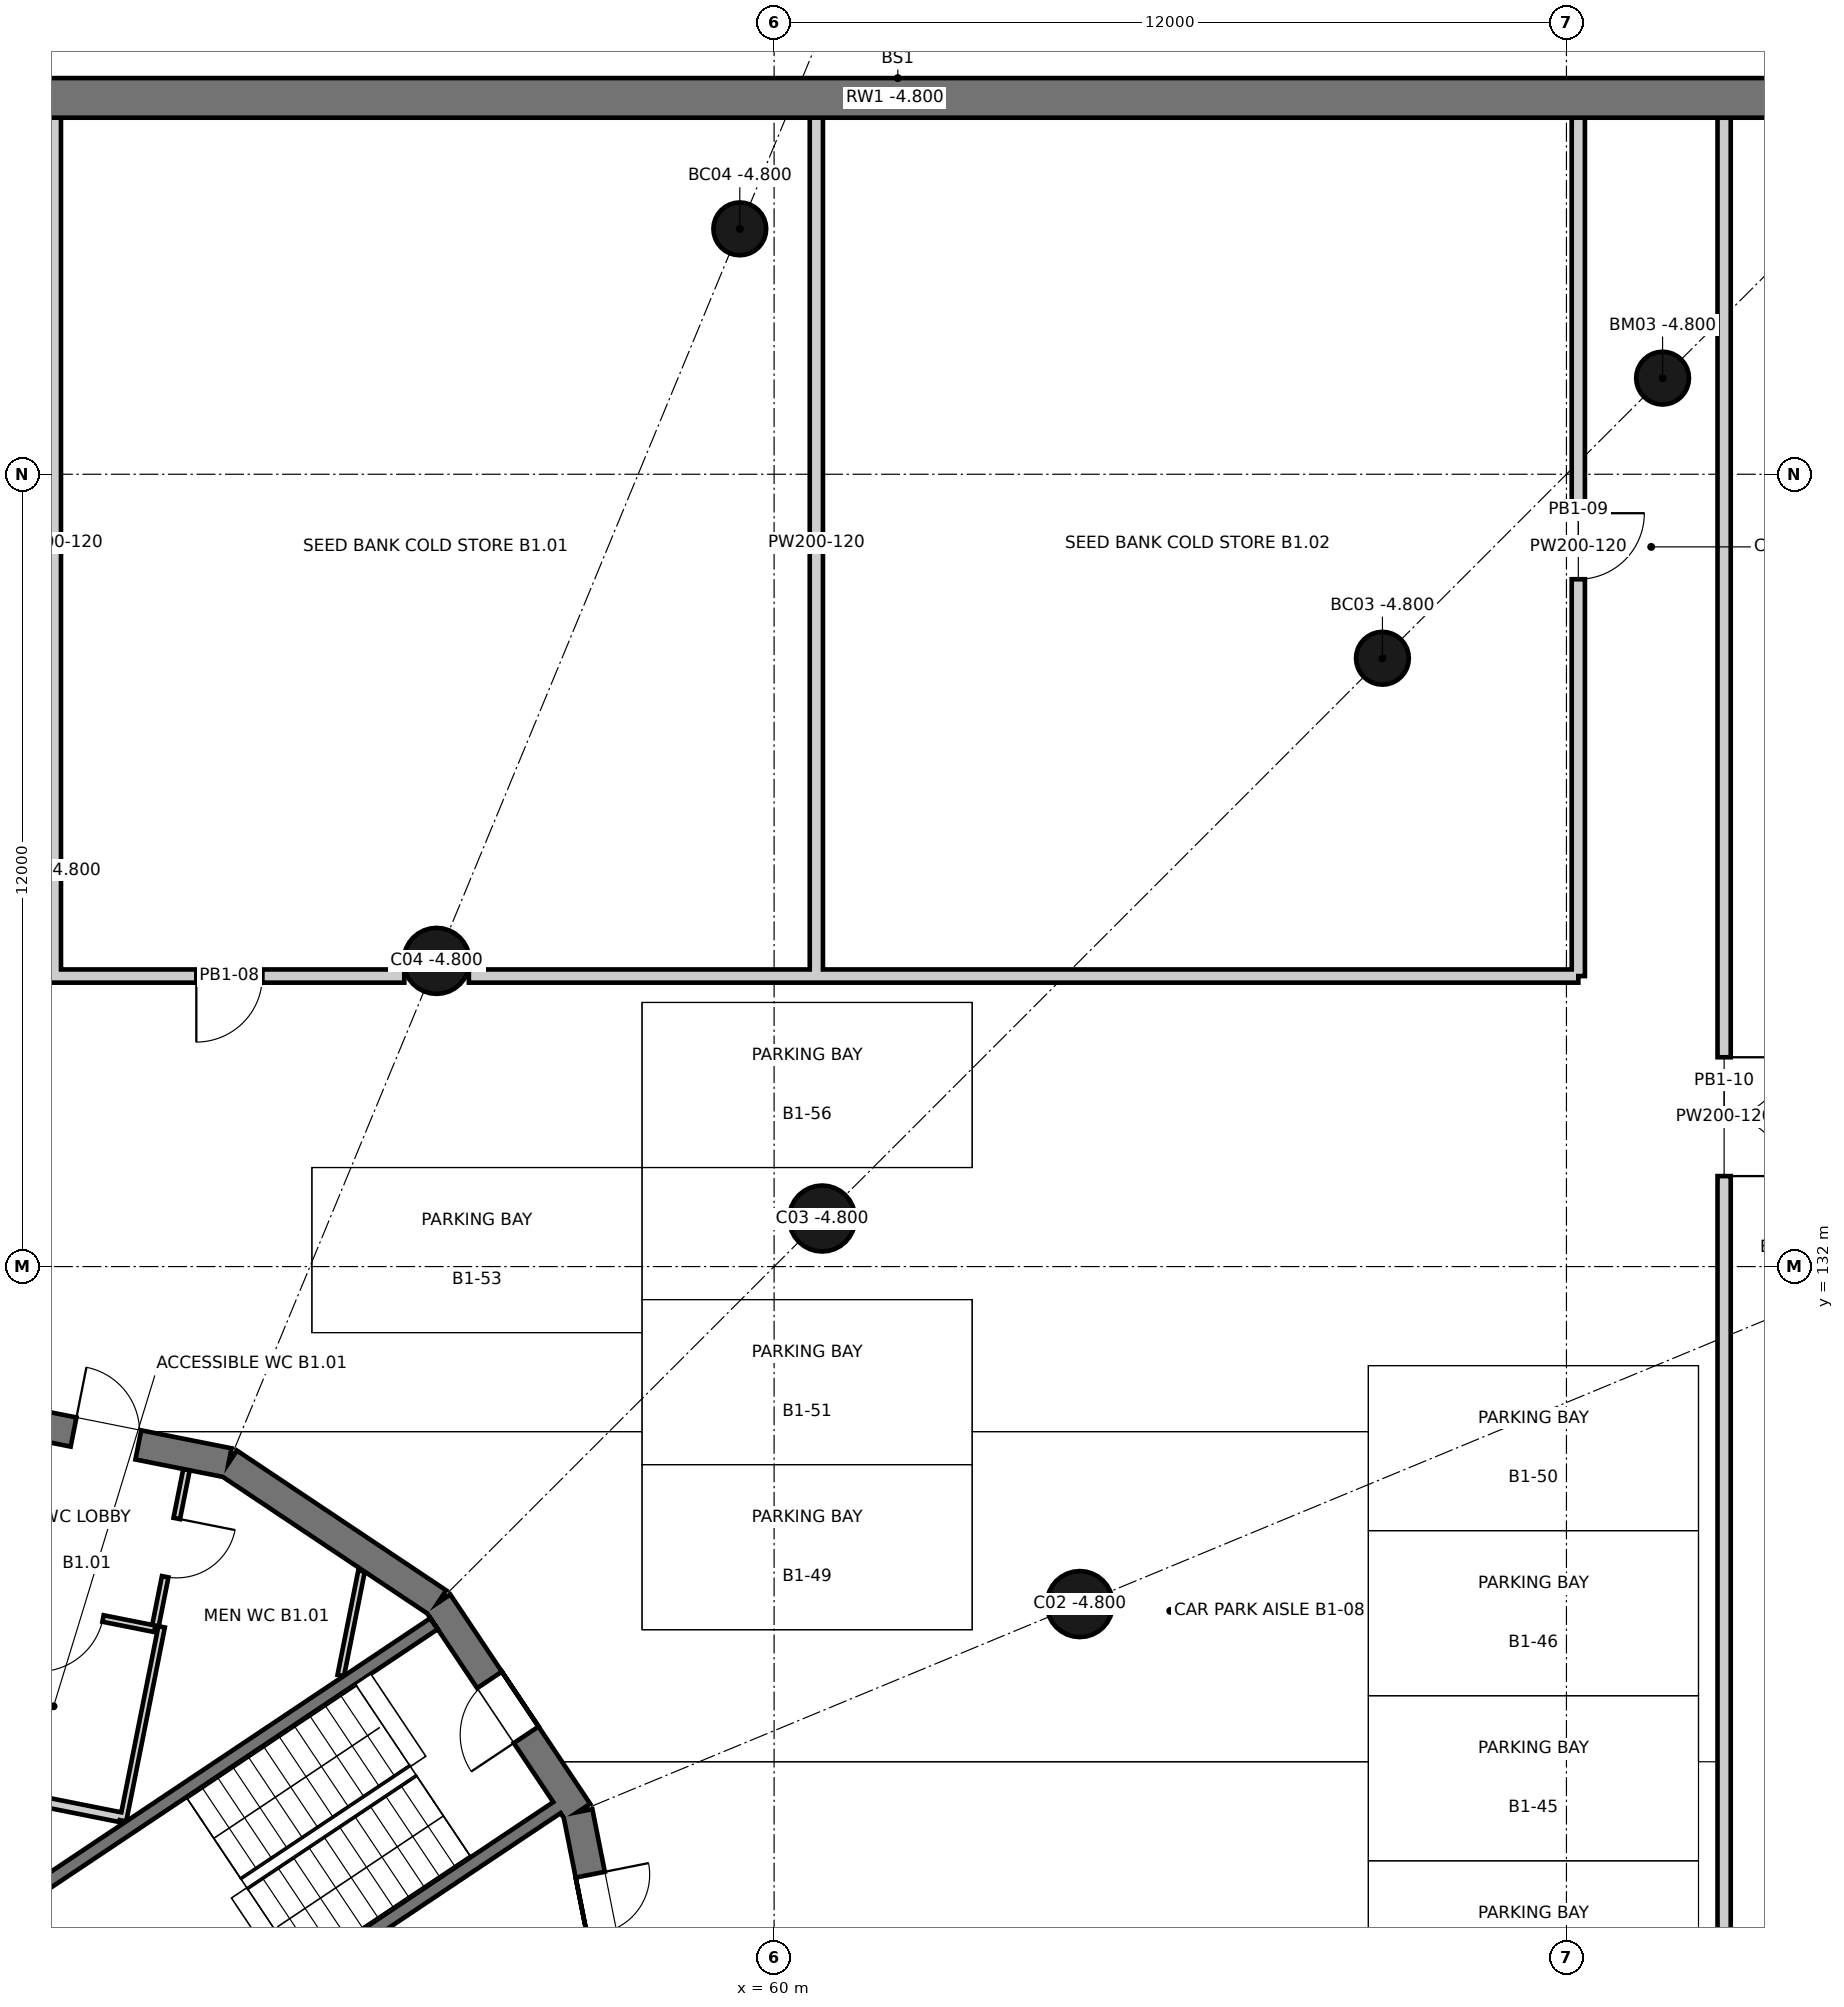
"""IFC4 building model, lengths in metres.
Left out: names, types, materials, properties, quantities, classifications, styles, units other than length and angle.
Written with IfcOpenShell. Run it as: python <this file> out.ifc"""

import sys

from ifc_helpers import new_model, si_unit, direction, frame, frame_2d, origin, origin_2d, place, context, subcontext, project, spatial, polyline, rectangle, circle, outline, extrude, element, fill, save


model = new_model("IFC4")
c1 = context("Model", 3, precision=1e-05, world=origin(), true_north=direction((0.0, 1.0)))
c2 = subcontext(c1, "Body", "Model", "MODEL_VIEW")
j1 = project(units=[si_unit("LENGTHUNIT", "METRE"), si_unit("PLANEANGLEUNIT", "RADIAN")], contexts=[c1])
p1 = place(None, origin())
s1 = spatial("IfcSite", under=j1, at=p1, CompositionType="ELEMENT")
p2 = place(p1, origin())
s2 = spatial("IfcBuilding", under=s1, at=p2, CompositionType="ELEMENT")
p3 = place(p2, frame((0.0, 0.0, -4.2)))
s3 = spatial("IfcBuildingStorey", under=s2, at=p3, CompositionType="ELEMENT", Elevation=-4.2)
p4 = place(p3, frame((57.771, 120.0, -0.6), z_axis=(0.0, 0.0, 1.0), x_axis=(-0.195069197673, 0.98078948206, 0.0)))
e1 = element("IfcWall", 1, at=p4, inside=s3, PredefinedType="SHEAR", context=c2, shape_type="SweptSolid", body=[
    extrude(outline(polyline([(-0.045, -0.225), (3.857, -0.225), (3.768, 0.225), (0.045, 0.225), (-0.045, -0.225)])), origin(), (0.0, 0.0, 1.0), 4.8),
])
p5 = place(p4, frame((1.945, 0.0, 0.6)))
e2 = element("IfcOpeningElement", 2, at=p5, cuts=e1, PredefinedType="OPENING", context=c2, shape_type="SweptSolid", body=[
    extrude(rectangle(XDim=0.9, YDim=2.1, at=frame_2d((0.45, 1.05))), frame((0.0, 0.235, 0.0), z_axis=(0.0, -1.0, 0.0), x_axis=(1.0, 0.0, 0.0)), (0.0, 0.0, 1.0), 0.47),
])
p6 = place(p3, frame((57.027, 123.739, -0.6), z_axis=(0.0, 0.0, 1.0), x_axis=(-0.555542277102, 0.83148829117, 0.0)))
e3 = element("IfcWall", 3, at=p6, inside=s3, PredefinedType="SHEAR", context=c2, shape_type="SweptSolid", body=[
    extrude(outline(polyline([(-0.045, -0.225), (3.857, -0.225), (3.768, 0.225), (0.045, 0.225), (-0.045, -0.225)])), origin(), (0.0, 0.0, 1.0), 4.8),
])
p7 = place(p6, frame((1.406, 0.0, 0.6)))
e4 = element("IfcOpeningElement", 4, at=p7, cuts=e3, PredefinedType="OPENING", context=c2, shape_type="SweptSolid", body=[
    extrude(rectangle(XDim=1.0, YDim=2.1, at=frame_2d((0.5, 1.05))), frame((0.0, 0.235, 0.0), z_axis=(0.0, -1.0, 0.0), x_axis=(1.0, 0.0, 0.0)), (0.0, 0.0, 1.0), 0.47),
])
p8 = place(p3, frame((54.909, 126.909, -0.6), z_axis=(0.0, 0.0, 1.0), x_axis=(-0.83148829117, 0.555542277102, 0.0)))
e5 = element("IfcWall", 5, at=p8, inside=s3, PredefinedType="SHEAR", context=c2, shape_type="SweptSolid", body=[
    extrude(outline(polyline([(-0.045, -0.225), (3.857, -0.225), (3.768, 0.225), (0.045, 0.225), (-0.045, -0.225)])), origin(), (0.0, 0.0, 1.0), 4.8),
])
p9 = place(p3, frame((51.739, 129.027, -0.6), z_axis=(0.0, 0.0, 1.0), x_axis=(-0.98078948206, 0.195069197673, 0.0)))
e6 = element("IfcWall", 6, at=p9, inside=s3, PredefinedType="SHEAR", context=c2, shape_type="SweptSolid", body=[
    extrude(outline(polyline([(-0.045, -0.225), (3.857, -0.225), (3.768, 0.225), (0.045, 0.225), (-0.045, -0.225)])), origin(), (0.0, 0.0, 1.0), 4.8),
])
p10 = place(p9, frame((1.395, 0.0, 0.6)))
e7 = element("IfcOpeningElement", 7, at=p10, cuts=e6, PredefinedType="OPENING", context=c2, shape_type="SweptSolid", body=[
    extrude(rectangle(XDim=1.0, YDim=2.1, at=frame_2d((0.5, 1.05))), frame((0.0, 0.235, 0.0), z_axis=(0.0, -1.0, 0.0), x_axis=(1.0, 0.0, 0.0)), (0.0, 0.0, 1.0), 0.47),
])
p11 = place(p3, frame((48.365, 122.258, -0.6), z_axis=(0.0, 0.0, 1.0), x_axis=(0.831476803301, 0.555559470779, 0.0)))
e8 = element("IfcWall", 8, at=p11, inside=s3, PredefinedType="SHEAR", context=c2, shape_type="SweptSolid", body=[
    extrude(rectangle(XDim=7.8, YDim=0.2, at=frame_2d((3.9, 0.0))), origin(), (0.0, 0.0, 1.0), 4.8),
])
p12 = place(p3, frame((50.226, 119.473, -0.6), z_axis=(0.0, 0.0, 1.0), x_axis=(0.831486463828, 0.555545012102, 0.0)))
e9 = element("IfcWall", 9, at=p12, inside=s3, PredefinedType="SHEAR", context=c2, shape_type="SweptSolid", body=[
    extrude(rectangle(XDim=7.8, YDim=0.2, at=frame_2d((3.9, 0.0))), origin(), (0.0, 0.0, 1.0), 4.8),
])
p13 = place(p3, frame((50.253, 119.612, -0.6), z_axis=(0.0, 0.0, 1.0), x_axis=(-0.55555842186, 0.831477504146, 0.0)))
e10 = element("IfcWall", 10, at=p13, inside=s3, PredefinedType="SHEAR", context=c2, shape_type="SweptSolid", body=[
    extrude(rectangle(XDim=3.15, YDim=0.2, at=frame_2d((1.575, 0.0))), origin(), (0.0, 0.0, 1.0), 4.8),
])
for number, where, z_axis, x_axis in (
    (11, (64.63, 126.888, -0.6), (0.0, 0.0, 1.0), (1.0, 0.0, 0.0)),
    (12, (60.728, 132.728, -0.6), (0.0, 0.0, 1.0), (1.0, 0.0, 0.0)),
    (13, (54.888, 136.63, -0.6), (0.0, 0.0, 1.0), (1.0, 0.0, 0.0)),
):
    element("IfcColumn", number, at=place(p3, frame(where, z_axis=z_axis, x_axis=x_axis)), inside=s3, PredefinedType="COLUMN", context=c2, shape_type="SweptSolid", body=[
        extrude(circle(Radius=0.5, at=origin_2d()), origin(), (0.0, 0.0, 1.0), 4.8),
    ])
for number, where, z_axis, x_axis in (
    (14, (69.213, 141.213, -0.6), (0.0, 0.0, 1.0), (1.0, 0.0, 0.0)),
    (15, (59.48, 147.716, -0.6), (0.0, 0.0, 1.0), (1.0, 0.0, 0.0)),
    (16, (73.456, 145.456, -0.6), (0.0, 0.0, 1.0), (1.0, 0.0, 0.0)),
):
    element("IfcColumn", number, at=place(p3, frame(where, z_axis=z_axis, x_axis=x_axis)), inside=s3, PredefinedType="COLUMN", context=c2, shape_type="SweptSolid", body=[
        extrude(circle(Radius=0.4, at=origin_2d()), origin(), (0.0, 0.0, 1.0), 4.35),
    ])
p14 = place(p3, frame((77.156, 149.7, -0.6), z_axis=(0.0, 0.0, 1.0), x_axis=(-1.0, 0.0, 0.0)))
e17 = element("IfcWall", 17, at=p14, inside=s3, PredefinedType="SOLIDWALL", context=c2, shape_type="SweptSolid", body=[
    extrude(outline(polyline([(-0.091, -0.3), (58.404, -0.3), (58.221, 0.3), (0.091, 0.3), (-0.091, -0.3)])), origin(), (0.0, 0.0, 1.0), 4.8),
])
p15 = place(p3, frame((50.621, 126.514, 0.0), z_axis=(0.0, 0.0, 1.0), x_axis=(-0.980796771907, 0.195032541431, 0.0)))
e18 = element("IfcWall", 18, at=p15, inside=s3, PredefinedType="PARTITIONING", context=c2, shape_type="SweptSolid", body=[
    extrude(rectangle(XDim=2.6, YDim=0.1, at=frame_2d((1.3, 0.0))), origin(), (0.0, 0.0, 1.0), 3.85),
])
p16 = place(p15, frame((0.8, 0.0, 0.0)))
e19 = element("IfcOpeningElement", 19, at=p16, cuts=e18, PredefinedType="OPENING", context=c2, shape_type="SweptSolid", body=[
    extrude(rectangle(XDim=1.0, YDim=2.1, at=frame_2d((0.5, 1.05))), frame((0.0, 0.06, 0.0), z_axis=(0.0, -1.0, 0.0), x_axis=(1.0, 0.0, 0.0)), (0.0, 0.0, 1.0), 0.12),
])
p17 = place(p3, frame((51.101, 128.924, 0.0), z_axis=(0.0, 0.0, 1.0), x_axis=(-0.195082584577, -0.980786819444, 0.0)))
e20 = element("IfcWall", 20, at=p17, inside=s3, PredefinedType="PARTITIONING", context=c2, shape_type="SweptSolid", body=[
    extrude(rectangle(XDim=2.408, YDim=0.1, at=frame_2d((1.204, 0.0))), origin(), (0.0, 0.0, 1.0), 3.85),
])
p18 = place(p17, frame((0.754, 0.0, 0.0)))
e21 = element("IfcOpeningElement", 21, at=p18, cuts=e20, PredefinedType="OPENING", context=c2, shape_type="SweptSolid", body=[
    extrude(rectangle(XDim=0.9, YDim=2.1, at=frame_2d((0.45, 1.05))), frame((0.0, 0.06, 0.0), z_axis=(0.0, -1.0, 0.0), x_axis=(1.0, 0.0, 0.0)), (0.0, 0.0, 1.0), 0.12),
])
p19 = place(p3, frame((50.099, 123.661, 0.0), z_axis=(0.0, 0.0, 1.0), x_axis=(-0.980775457146, 0.195139700368, 0.0)))
e22 = element("IfcWall", 22, at=p19, inside=s3, PredefinedType="PARTITIONING", context=c2, shape_type="SweptSolid", body=[
    extrude(rectangle(XDim=2.645, YDim=0.15, at=frame_2d((1.322, 0.0))), origin(), (0.0, 0.0, 1.0), 3.85),
])
p20 = place(p3, frame((50.724, 126.544, 0.0), z_axis=(0.0, 0.0, 1.0), x_axis=(-0.195081327989, -0.980787069384, 0.0)))
e23 = element("IfcWall", 23, at=p20, inside=s3, PredefinedType="PARTITIONING", context=c2, shape_type="SweptSolid", body=[
    extrude(rectangle(XDim=2.995, YDim=0.1, at=frame_2d((1.498, 0.0))), origin(), (0.0, 0.0, 1.0), 3.85),
])
p21 = place(p3, frame((53.752, 127.389, 0.0), z_axis=(0.0, 0.0, 1.0), x_axis=(-0.195010443139, -0.980801165918, 0.0)))
e24 = element("IfcWall", 24, at=p21, inside=s3, PredefinedType="PARTITIONING", context=c2, shape_type="SweptSolid", body=[
    extrude(rectangle(XDim=1.614, YDim=0.1, at=frame_2d((0.807, 0.0))), origin(), (0.0, 0.0, 1.0), 3.85),
])
p22 = place(p3, frame((49.1, 149.42, 0.0), z_axis=(0.0, 0.0, 1.0), x_axis=(0.0, -1.0, 0.0)))
e25 = element("IfcWall", 25, at=p22, inside=s3, PredefinedType="SOLIDWALL", context=c2, shape_type="SweptSolid", body=[
    extrude(rectangle(XDim=12.925, YDim=0.2, at=frame_2d((6.462, 0.0))), origin(), (0.0, 0.0, 1.0), 3.75),
])
p23 = place(p3, frame((49.1, 136.4, 0.0), z_axis=(0.0, 0.0, 1.0), x_axis=(-1.0, 0.0, 0.0)))
e26 = element("IfcWall", 26, at=p23, inside=s3, PredefinedType="SOLIDWALL", context=c2, shape_type="SweptSolid", body=[
    extrude(rectangle(XDim=7.5, YDim=0.2, at=frame_2d((3.75, 0.0))), origin(), (0.0, 0.0, 1.0), 3.85),
])
p24 = place(p3, frame((60.64, 149.42, 0.0), z_axis=(0.0, 0.0, 1.0), x_axis=(0.0, -1.0, 0.0)))
e27 = element("IfcWall", 27, at=p24, inside=s3, PredefinedType="SOLIDWALL", context=c2, shape_type="SweptSolid", body=[
    extrude(rectangle(XDim=12.925, YDim=0.2, at=frame_2d((6.462, 0.0))), origin(), (0.0, 0.0, 1.0), 3.75),
])
p25 = place(p3, frame((54.399, 136.4, 0.0), z_axis=(0.0, 0.0, 1.0), x_axis=(-1.0, 0.0, 0.0)))
e28 = element("IfcWall", 28, at=p25, inside=s3, PredefinedType="SOLIDWALL", context=c2, shape_type="SweptSolid", body=[
    extrude(rectangle(XDim=5.299, YDim=0.2, at=frame_2d((2.65, 0.0))), origin(), (0.0, 0.0, 1.0), 3.85),
])
p26 = place(p25, frame((2.15, 0.0, 0.0)))
e29 = element("IfcOpeningElement", 29, at=p26, cuts=e28, PredefinedType="OPENING", context=c2, shape_type="SweptSolid", body=[
    extrude(rectangle(XDim=1.0, YDim=2.1, at=frame_2d((0.5, 1.05))), frame((0.0, 0.11, 0.0), z_axis=(0.0, -1.0, 0.0), x_axis=(1.0, 0.0, 0.0)), (0.0, 0.0, 1.0), 0.22),
])
p27 = place(p3, frame((60.64, 136.4, 0.0), z_axis=(0.0, 0.0, 1.0), x_axis=(-1.0, 0.0, 0.0)))
e30 = element("IfcWall", 30, at=p27, inside=s3, PredefinedType="SOLIDWALL", context=c2, shape_type="SweptSolid", body=[
    extrude(rectangle(XDim=5.263, YDim=0.2, at=frame_2d((2.631, 0.0))), origin(), (0.0, 0.0, 1.0), 3.85),
])
p28 = place(p3, frame((72.18, 149.42, 0.0), z_axis=(0.0, 0.0, 1.0), x_axis=(0.0, -1.0, 0.0)))
e31 = element("IfcWall", 31, at=p28, inside=s3, PredefinedType="SOLIDWALL", context=c2, shape_type="SweptSolid", body=[
    extrude(rectangle(XDim=13.02, YDim=0.2, at=frame_2d((6.51, 0.0))), origin(), (0.0, 0.0, 1.0), 3.75),
])
p29 = place(p28, frame((6.01, 0.0, 0.0)))
e32 = element("IfcOpeningElement", 32, at=p29, cuts=e31, PredefinedType="OPENING", context=c2, shape_type="SweptSolid", body=[
    extrude(rectangle(XDim=1.0, YDim=2.1, at=frame_2d((0.5, 1.05))), frame((0.0, 0.11, 0.0), z_axis=(0.0, -1.0, 0.0), x_axis=(1.0, 0.0, 0.0)), (0.0, 0.0, 1.0), 0.22),
])
p30 = place(p3, frame((72.18, 136.4, 0.0), z_axis=(0.0, 0.0, 1.0), x_axis=(-1.0, 0.0, 0.0)))
e33 = element("IfcWall", 33, at=p30, inside=s3, PredefinedType="SOLIDWALL", context=c2, shape_type="SweptSolid", body=[
    extrude(rectangle(XDim=11.54, YDim=0.2, at=frame_2d((5.77, 0.0))), origin(), (0.0, 0.0, 1.0), 3.75),
])
p31 = place(p3, frame((74.388, 119.12, 0.0), z_axis=(0.0, 0.0, 1.0), x_axis=(0.0, 1.0, 0.0)))
e34 = element("IfcWall", 34, at=p31, inside=s3, PredefinedType="SOLIDWALL", context=c2, shape_type="SweptSolid", body=[
    extrude(rectangle(XDim=30.3, YDim=0.2, at=frame_2d((15.15, 0.0))), origin(), (0.0, 0.0, 1.0), 3.75),
])
p32 = place(p31, frame((14.25, 0.0, 0.0)))
e35 = element("IfcOpeningElement", 35, at=p32, cuts=e34, PredefinedType="OPENING", context=c2, shape_type="SweptSolid", body=[
    extrude(rectangle(XDim=1.8, YDim=2.1, at=frame_2d((0.9, 1.05))), frame((0.0, 0.11, 0.0), z_axis=(0.0, -1.0, 0.0), x_axis=(1.0, 0.0, 0.0)), (0.0, 0.0, 1.0), 0.22),
])
p33 = place(p7, origin())
e36 = element("IfcDoor", 36, at=p33, inside=s3, OperationType="SINGLE_SWING_LEFT", PredefinedType="DOOR", context=c2, shape_type="SweptSolid", body=[
    extrude(rectangle(XDim=1.0, YDim=2.1, at=frame_2d((0.5, 1.05))), frame((0.0, 0.025, 0.0), z_axis=(0.0, -1.0, 0.0), x_axis=(1.0, 0.0, 0.0)), (0.0, 0.0, 1.0), 0.05),
])
fill(e4, e36)
p34 = place(p5, frame((0.9, 0.0, 0.0), z_axis=(0.0, 0.0, 1.0), x_axis=(-1.0, 0.0, 0.0)))
e37 = element("IfcDoor", 37, at=p34, inside=s3, OperationType="SINGLE_SWING_LEFT", PredefinedType="DOOR", context=c2, shape_type="SweptSolid", body=[
    extrude(rectangle(XDim=0.9, YDim=2.1, at=frame_2d((0.45, 1.05))), frame((0.0, 0.025, 0.0), z_axis=(0.0, -1.0, 0.0), x_axis=(1.0, 0.0, 0.0)), (0.0, 0.0, 1.0), 0.05),
])
fill(e2, e37)
p35 = place(p10, frame((1.0, 0.0, 0.0), z_axis=(0.0, 0.0, 1.0), x_axis=(-1.0, 0.0, 0.0)))
e38 = element("IfcDoor", 38, at=p35, inside=s3, OperationType="SINGLE_SWING_LEFT", PredefinedType="DOOR", context=c2, shape_type="SweptSolid", body=[
    extrude(rectangle(XDim=1.0, YDim=2.1, at=frame_2d((0.5, 1.05))), frame((0.0, 0.025, 0.0), z_axis=(0.0, -1.0, 0.0), x_axis=(1.0, 0.0, 0.0)), (0.0, 0.0, 1.0), 0.05),
])
fill(e7, e38)
p36 = place(p16, origin())
e39 = element("IfcDoor", 39, at=p36, inside=s3, OperationType="SINGLE_SWING_RIGHT", PredefinedType="DOOR", context=c2, shape_type="SweptSolid", body=[
    extrude(rectangle(XDim=1.0, YDim=2.1, at=frame_2d((0.5, 1.05))), frame((0.0, 0.025, 0.0), z_axis=(0.0, -1.0, 0.0), x_axis=(1.0, 0.0, 0.0)), (0.0, 0.0, 1.0), 0.05),
])
fill(e19, e39)
p37 = place(p18, origin())
e40 = element("IfcDoor", 40, at=p37, inside=s3, OperationType="SINGLE_SWING_LEFT", PredefinedType="DOOR", context=c2, shape_type="SweptSolid", body=[
    extrude(rectangle(XDim=0.9, YDim=2.1, at=frame_2d((0.45, 1.05))), frame((0.0, 0.025, 0.0), z_axis=(0.0, -1.0, 0.0), x_axis=(1.0, 0.0, 0.0)), (0.0, 0.0, 1.0), 0.05),
])
fill(e21, e40)
p38 = place(p26, origin())
e41 = element("IfcDoor", 41, at=p38, inside=s3, OperationType="SINGLE_SWING_RIGHT", PredefinedType="DOOR", context=c2, shape_type="SweptSolid", body=[
    extrude(rectangle(XDim=1.0, YDim=2.1, at=frame_2d((0.5, 1.05))), frame((0.0, 0.025, 0.0), z_axis=(0.0, -1.0, 0.0), x_axis=(1.0, 0.0, 0.0)), (0.0, 0.0, 1.0), 0.05),
])
fill(e29, e41)
p39 = place(p29, origin())
e42 = element("IfcDoor", 42, at=p39, inside=s3, OperationType="SINGLE_SWING_LEFT", PredefinedType="DOOR", context=c2, shape_type="SweptSolid", body=[
    extrude(rectangle(XDim=1.0, YDim=2.1, at=frame_2d((0.5, 1.05))), frame((0.0, 0.025, 0.0), z_axis=(0.0, -1.0, 0.0), x_axis=(1.0, 0.0, 0.0)), (0.0, 0.0, 1.0), 0.05),
])
fill(e32, e42)
p40 = place(p32, frame((1.8, 0.0, 0.0), z_axis=(0.0, 0.0, 1.0), x_axis=(-1.0, 0.0, 0.0)))
e43 = element("IfcDoor", 43, at=p40, inside=s3, OperationType="DOUBLE_DOOR_SINGLE_SWING", PredefinedType="DOOR", context=c2, shape_type="SweptSolid", body=[
    extrude(rectangle(XDim=1.8, YDim=2.1, at=frame_2d((0.9, 1.05))), frame((0.0, 0.025, 0.0), z_axis=(0.0, -1.0, 0.0), x_axis=(1.0, 0.0, 0.0)), (0.0, 0.0, 1.0), 0.05),
])
fill(e35, e43)
save(model, sys.argv[1])
